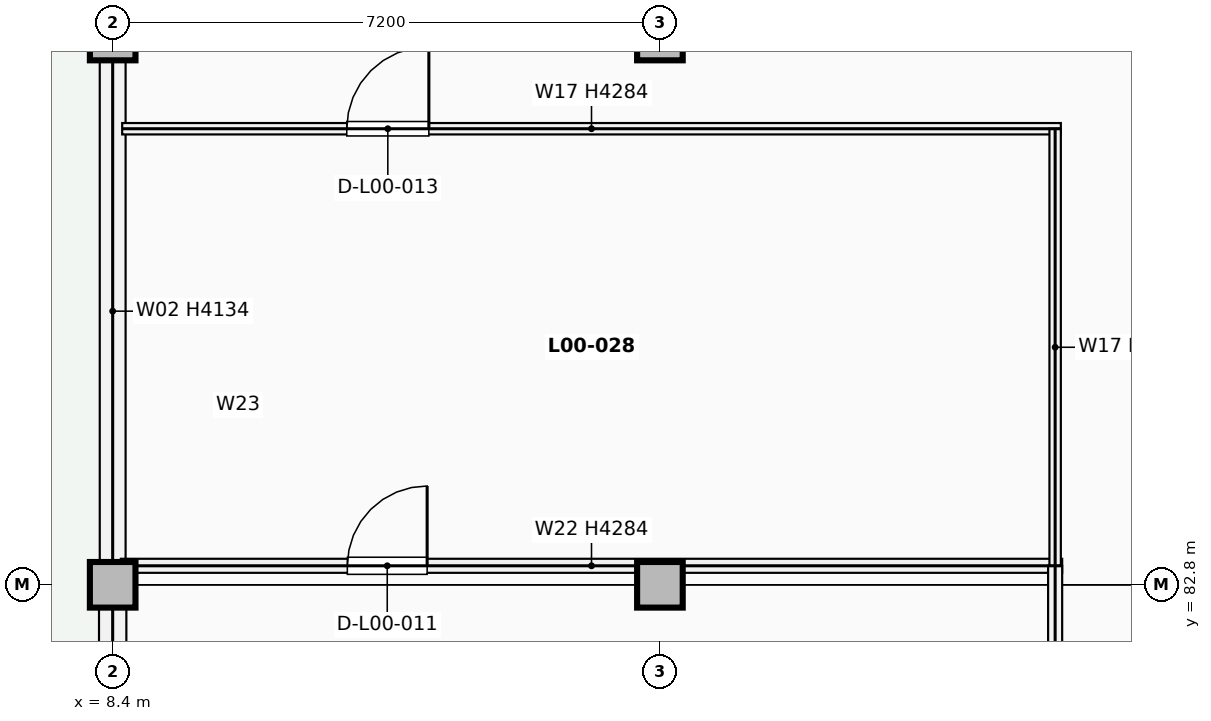
"""IFC4 building model, lengths in metres.
Left out: names, types, materials, properties, quantities, classifications, styles, units other than length and angle.
Written with IfcOpenShell. Run it as: python <this file> out.ifc"""

import sys

from ifc_helpers import new_model, si_unit, direction, frame, frame_2d, origin, origin_2d, place, context, subcontext, project, spatial, rectangle, extrude, element, fill, save


model = new_model("IFC4")
c1 = context("Model", 3, precision=1e-05, world=origin(), true_north=direction((0.0, 1.0)))
c2 = subcontext(c1, "Body", "Model", "MODEL_VIEW")
j1 = project(units=[si_unit("LENGTHUNIT", "METRE"), si_unit("PLANEANGLEUNIT", "RADIAN")], contexts=[c1])
p1 = place(None, origin())
s1 = spatial("IfcSite", under=j1, at=p1, CompositionType="ELEMENT")
p2 = place(p1, origin())
s2 = spatial("IfcBuilding", under=s1, at=p2, CompositionType="ELEMENT")
p3 = place(p2, origin())
s3 = spatial("IfcBuildingStorey", under=s2, at=p3, CompositionType="ELEMENT", Elevation=0.0)
for number, where, z_axis, x_axis in (
    (1, (8.4, 82.8, 0.0), (0.0, 0.0, 1.0), (1.0, 0.0, 0.0)),
    (2, (8.4, 90.0, 0.0), (0.0, 0.0, 1.0), (1.0, 0.0, 0.0)),
    (3, (15.6, 82.8, 0.0), (0.0, 0.0, 1.0), (1.0, 0.0, 0.0)),
    (4, (15.6, 90.0, 0.0), (0.0, 0.0, 1.0), (1.0, 0.0, 0.0)),
):
    element("IfcColumn", number, at=place(p3, frame(where, z_axis=z_axis, x_axis=x_axis)), inside=s3, PredefinedType="COLUMN", context=c2, shape_type="SweptSolid", body=[
        extrude(rectangle(XDim=0.6, YDim=0.6, at=origin_2d()), origin(), (0.0, 0.0, 1.0), 5.1),
    ])
p4 = place(p3, frame((8.4, 79.502, 0.0), z_axis=(0.0, 0.0, 1.0), x_axis=(0.0, 1.0, 0.0)))
e5 = element("IfcWall", 5, at=p4, inside=s3, PredefinedType="SOLIDWALL", context=c2, shape_type="SweptSolid", body=[
    extrude(rectangle(XDim=2.996, YDim=0.36, at=frame_2d((1.498, 0.0))), origin(), (0.0, 0.0, 1.0), 4.134),
])
p5 = place(p3, frame((8.4, 83.102, 0.0), z_axis=(0.0, 0.0, 1.0), x_axis=(0.0, 1.0, 0.0)))
e6 = element("IfcWall", 6, at=p5, inside=s3, PredefinedType="SOLIDWALL", context=c2, shape_type="SweptSolid", body=[
    extrude(rectangle(XDim=6.596, YDim=0.34, at=frame_2d((3.298, 0.0))), origin(), (0.0, 0.0, 1.0), 4.134),
])
p6 = place(p3, frame((8.508, 83.05, 0.0), z_axis=(0.0, 0.0, 1.0), x_axis=(1.0, 0.0, 0.0)))
e7 = element("IfcWall", 7, at=p6, inside=s3, PredefinedType="PARTITIONING", context=c2, shape_type="SweptSolid", body=[
    extrude(rectangle(XDim=12.385, YDim=0.185, at=frame_2d((6.192, 0.0))), origin(), (0.0, 0.0, 1.0), 4.284),
])
p7 = place(p6, frame((2.98, 0.0, 0.0)))
e8 = element("IfcOpeningElement", 8, at=p7, cuts=e7, PredefinedType="OPENING", context=c2, shape_type="SweptSolid", body=[
    extrude(rectangle(XDim=1.05, YDim=2.15, at=frame_2d((0.525, 1.075))), frame((0.0, 0.103, 0.0), z_axis=(0.0, -1.0, 0.0), x_axis=(1.0, 0.0, 0.0)), (0.0, 0.0, 1.0), 0.205),
])
p8 = place(p3, frame((20.8, 79.35, 0.0), z_axis=(0.0, 0.0, 1.0), x_axis=(0.0, 1.0, 0.0)))
e9 = element("IfcWall", 9, at=p8, inside=s3, PredefinedType="PARTITIONING", context=c2, shape_type="SweptSolid", body=[
    extrude(rectangle(XDim=3.7, YDim=0.185, at=frame_2d((1.85, 0.0))), origin(), (0.0, 0.0, 1.0), 4.134),
])
p9 = place(p3, frame((8.525, 88.8, 0.0), z_axis=(0.0, 0.0, 1.0), x_axis=(1.0, 0.0, 0.0)))
e10 = element("IfcWall", 10, at=p9, inside=s3, PredefinedType="PARTITIONING", context=c2, shape_type="SweptSolid", body=[
    extrude(rectangle(XDim=12.35, YDim=0.15, at=frame_2d((6.175, 0.0))), origin(), (0.0, 0.0, 1.0), 4.284),
])
p10 = place(p9, frame((2.955, 0.0, 0.0)))
e11 = element("IfcOpeningElement", 11, at=p10, cuts=e10, PredefinedType="OPENING", context=c2, shape_type="SweptSolid", body=[
    extrude(rectangle(XDim=1.08, YDim=2.16, at=frame_2d((0.54, 1.08))), frame((0.0, 0.085, 0.0), z_axis=(0.0, -1.0, 0.0), x_axis=(1.0, 0.0, 0.0)), (0.0, 0.0, 1.0), 0.17),
])
p11 = place(p3, frame((20.8, 83.05, 0.0), z_axis=(0.0, 0.0, 1.0), x_axis=(0.0, 1.0, 0.0)))
e12 = element("IfcWall", 12, at=p11, inside=s3, PredefinedType="PARTITIONING", context=c2, shape_type="SweptSolid", body=[
    extrude(rectangle(XDim=5.75, YDim=0.15, at=frame_2d((2.875, 0.0))), origin(), (0.0, 0.0, 1.0), 4.284),
])
p12 = place(p7, origin())
e13 = element("IfcDoor", 13, at=p12, inside=s3, OperationType="SINGLE_SWING_RIGHT", PredefinedType="DOOR", context=c2, shape_type="SweptSolid", body=[
    extrude(rectangle(XDim=1.05, YDim=2.15, at=frame_2d((0.525, 1.075))), frame((0.0, 0.025, 0.0), z_axis=(0.0, -1.0, 0.0), x_axis=(1.0, 0.0, 0.0)), (0.0, 0.0, 1.0), 0.05),
])
fill(e8, e13)
p13 = place(p10, origin())
e14 = element("IfcDoor", 14, at=p13, inside=s3, OperationType="SINGLE_SWING_RIGHT", PredefinedType="DOOR", context=c2, shape_type="SweptSolid", body=[
    extrude(rectangle(XDim=1.08, YDim=2.16, at=frame_2d((0.54, 1.08))), frame((0.0, 0.025, 0.0), z_axis=(0.0, -1.0, 0.0), x_axis=(1.0, 0.0, 0.0)), (0.0, 0.0, 1.0), 0.05),
])
fill(e11, e14)
save(model, sys.argv[1])
